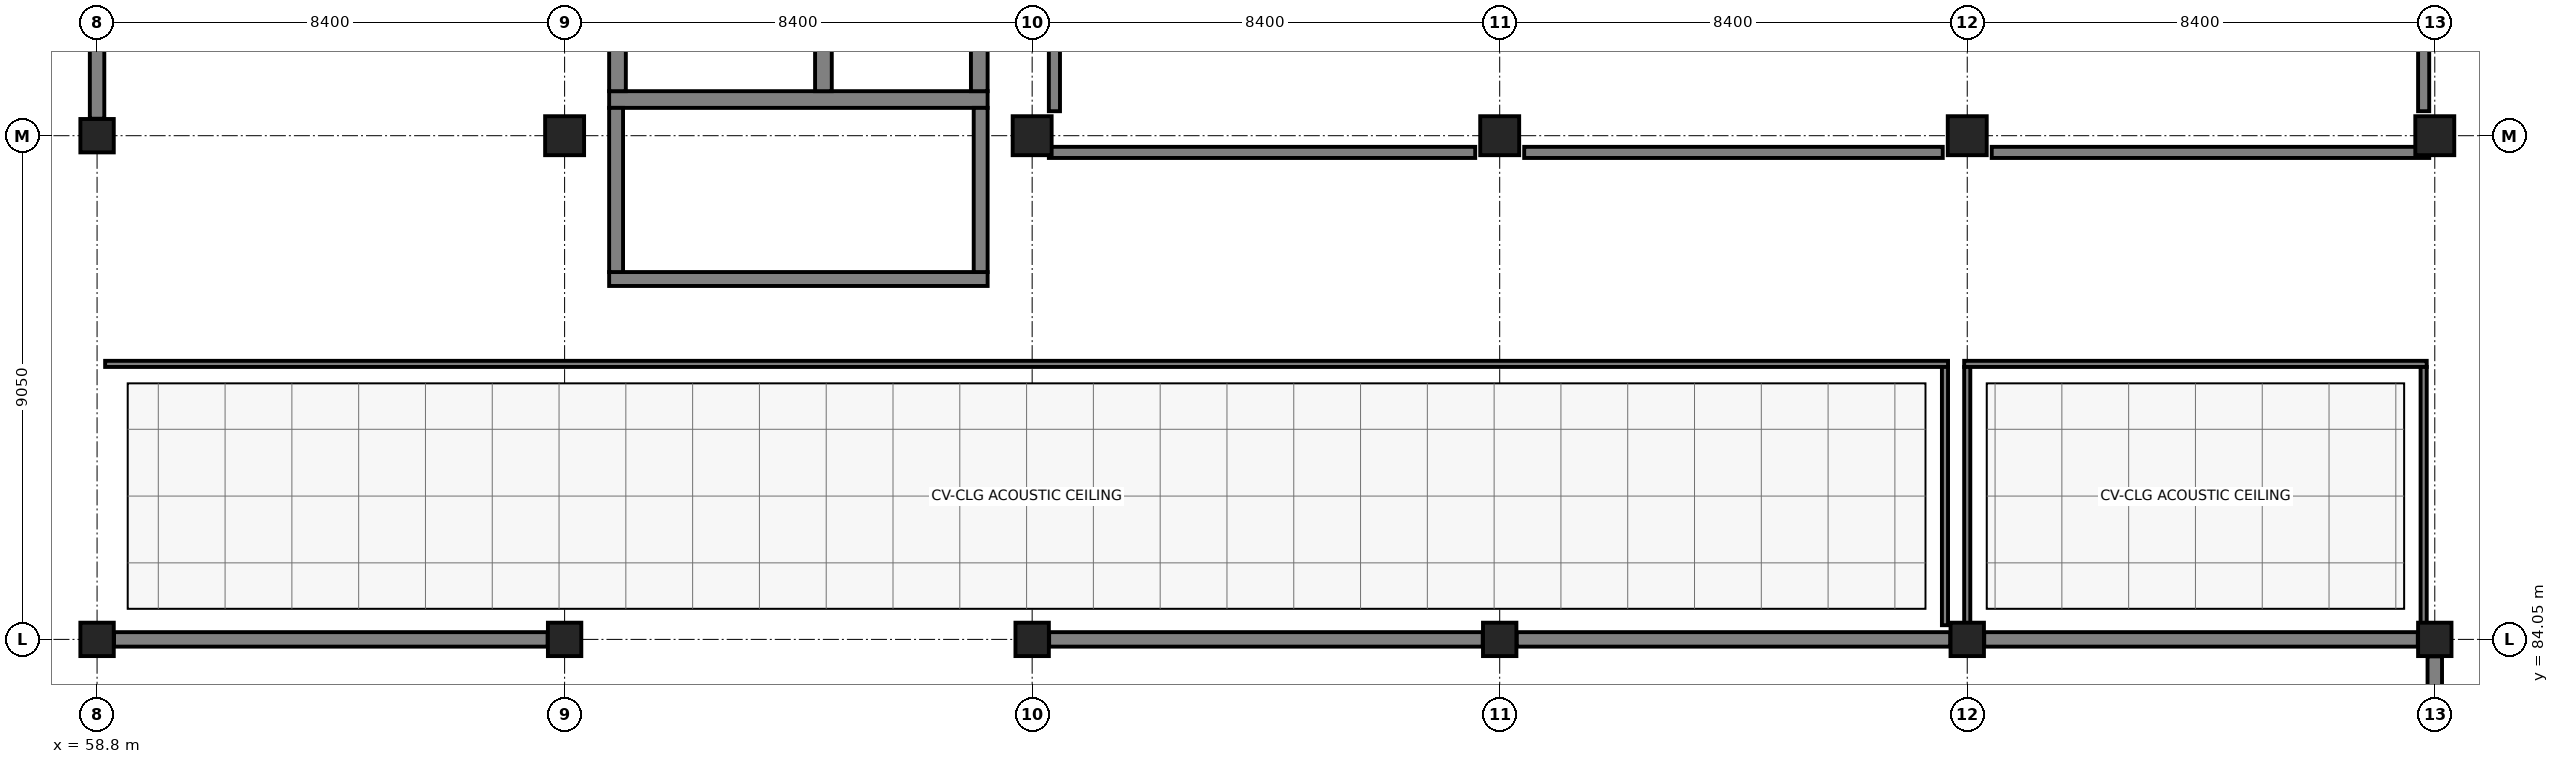
"""IFC4 building model, lengths in metres.
Left out: names, types, materials, properties, quantities, classifications, styles, units other than length and angle.
Written with IfcOpenShell. Run it as: python <this file> out.ifc"""

import sys

from ifc_helpers import new_model, si_unit, direction, frame, frame_2d, origin, origin_2d, place, context, subcontext, project, spatial, rectangle, extrude, element, fill, save


model = new_model("IFC4")
c1 = context("Model", 3, precision=1e-05, world=origin(), true_north=direction((0.0, 1.0)))
c2 = subcontext(c1, "Body", "Model", "MODEL_VIEW")
j1 = project(units=[si_unit("LENGTHUNIT", "METRE"), si_unit("PLANEANGLEUNIT", "RADIAN")], contexts=[c1])
p1 = place(None, origin())
s1 = spatial("IfcSite", under=j1, at=p1, CompositionType="ELEMENT")
p2 = place(p1, origin())
s2 = spatial("IfcBuilding", under=s1, at=p2, CompositionType="ELEMENT")
p3 = place(p2, frame((0.0, 0.0, 10.8)))
s3 = spatial("IfcBuildingStorey", under=s2, at=p3, CompositionType="ELEMENT", Elevation=10.8)
for number, where, z_axis, x_axis in (
    (1, (58.8, 84.05, 0.0), (0.0, 0.0, 1.0), (1.0, 0.0, 0.0)),
    (2, (58.8, 93.1, 0.0), (0.0, 0.0, 1.0), (1.0, 0.0, 0.0)),
    (3, (67.2, 84.05, 0.0), (0.0, 0.0, 1.0), (1.0, 0.0, 0.0)),
):
    element("IfcColumn", number, at=place(p3, frame(where, z_axis=z_axis, x_axis=x_axis)), inside=s3, PredefinedType="COLUMN", context=c2, shape_type="SweptSolid", body=[
        extrude(rectangle(XDim=0.6, YDim=0.6, at=origin_2d()), origin(), (0.0, 0.0, 1.0), 4.8),
    ])
p4 = place(p3, frame((67.2, 93.1, 0.0), z_axis=(0.0, 0.0, 1.0), x_axis=(1.0, 0.0, 0.0)))
e4 = element("IfcColumn", 4, at=p4, inside=s3, PredefinedType="COLUMN", context=c2, shape_type="SweptSolid", body=[
    extrude(rectangle(XDim=0.7, YDim=0.7, at=origin_2d()), origin(), (0.0, 0.0, 1.0), 4.8),
])
p5 = place(p3, frame((75.6, 84.05, 0.0), z_axis=(0.0, 0.0, 1.0), x_axis=(1.0, 0.0, 0.0)))
e5 = element("IfcColumn", 5, at=p5, inside=s3, PredefinedType="COLUMN", context=c2, shape_type="SweptSolid", body=[
    extrude(rectangle(XDim=0.6, YDim=0.6, at=origin_2d()), origin(), (0.0, 0.0, 1.0), 4.8),
])
p6 = place(p3, frame((75.6, 93.1, 0.0), z_axis=(0.0, 0.0, 1.0), x_axis=(1.0, 0.0, 0.0)))
e6 = element("IfcColumn", 6, at=p6, inside=s3, PredefinedType="COLUMN", context=c2, shape_type="SweptSolid", body=[
    extrude(rectangle(XDim=0.7, YDim=0.7, at=origin_2d()), origin(), (0.0, 0.0, 1.0), 4.8),
])
p7 = place(p3, frame((84.0, 84.05, 0.0), z_axis=(0.0, 0.0, 1.0), x_axis=(1.0, 0.0, 0.0)))
e7 = element("IfcColumn", 7, at=p7, inside=s3, PredefinedType="COLUMN", context=c2, shape_type="SweptSolid", body=[
    extrude(rectangle(XDim=0.6, YDim=0.6, at=origin_2d()), origin(), (0.0, 0.0, 1.0), 4.8),
])
p8 = place(p3, frame((84.0, 93.1, 0.0), z_axis=(0.0, 0.0, 1.0), x_axis=(1.0, 0.0, 0.0)))
e8 = element("IfcColumn", 8, at=p8, inside=s3, PredefinedType="COLUMN", context=c2, shape_type="SweptSolid", body=[
    extrude(rectangle(XDim=0.7, YDim=0.7, at=origin_2d()), origin(), (0.0, 0.0, 1.0), 4.8),
])
p9 = place(p3, frame((92.4, 84.05, 0.0), z_axis=(0.0, 0.0, 1.0), x_axis=(1.0, 0.0, 0.0)))
e9 = element("IfcColumn", 9, at=p9, inside=s3, PredefinedType="COLUMN", context=c2, shape_type="SweptSolid", body=[
    extrude(rectangle(XDim=0.6, YDim=0.6, at=origin_2d()), origin(), (0.0, 0.0, 1.0), 4.8),
])
p10 = place(p3, frame((92.4, 93.1, 0.0), z_axis=(0.0, 0.0, 1.0), x_axis=(1.0, 0.0, 0.0)))
e10 = element("IfcColumn", 10, at=p10, inside=s3, PredefinedType="COLUMN", context=c2, shape_type="SweptSolid", body=[
    extrude(rectangle(XDim=0.7, YDim=0.7, at=origin_2d()), origin(), (0.0, 0.0, 1.0), 4.8),
])
p11 = place(p3, frame((100.8, 84.05, 0.0), z_axis=(0.0, 0.0, 1.0), x_axis=(1.0, 0.0, 0.0)))
e11 = element("IfcColumn", 11, at=p11, inside=s3, PredefinedType="COLUMN", context=c2, shape_type="SweptSolid", body=[
    extrude(rectangle(XDim=0.6, YDim=0.6, at=origin_2d()), origin(), (0.0, 0.0, 1.0), 4.8),
])
p12 = place(p3, frame((100.8, 93.1, 0.0), z_axis=(0.0, 0.0, 1.0), x_axis=(1.0, 0.0, 0.0)))
e12 = element("IfcColumn", 12, at=p12, inside=s3, PredefinedType="COLUMN", context=c2, shape_type="SweptSolid", body=[
    extrude(rectangle(XDim=0.7, YDim=0.7, at=origin_2d()), origin(), (0.0, 0.0, 1.0), 4.8),
])
p13 = place(p3, frame((58.8, 101.845, 0.0), z_axis=(0.0, 0.0, 1.0), x_axis=(0.0, -1.0, 0.0)))
e13 = element("IfcWall", 13, at=p13, inside=s3, PredefinedType="STANDARD", context=c2, shape_type="SweptSolid", body=[
    extrude(rectangle(XDim=8.44, YDim=0.26, at=frame_2d((4.22, 0.0))), origin(), (0.0, 0.0, 1.0), 3.65),
])
p14 = place(p13, frame((3.42, 0.0, 0.0)))
e14 = element("IfcOpeningElement", 14, at=p14, cuts=e13, PredefinedType="OPENING", context=c2, shape_type="SweptSolid", body=[
    extrude(rectangle(XDim=1.6, YDim=2.25, at=frame_2d((0.8, 1.125))), frame((0.0, 0.14, 0.0), z_axis=(0.0, -1.0, 0.0), x_axis=(1.0, 0.0, 0.0)), (0.0, 0.0, 1.0), 0.28),
])
p15 = place(p3, frame((59.105, 84.05, 0.0), z_axis=(0.0, 0.0, 1.0), x_axis=(1.0, 0.0, 0.0)))
e15 = element("IfcWall", 15, at=p15, inside=s3, PredefinedType="STANDARD", context=c2, shape_type="SweptSolid", body=[
    extrude(rectangle(XDim=7.79, YDim=0.26, at=frame_2d((3.895, 0.0))), origin(), (0.0, 0.0, 1.0), 3.63),
])
p16 = place(p15, frame((2.215, 0.0, 0.95)))
e16 = element("IfcOpeningElement", 16, at=p16, cuts=e15, PredefinedType="OPENING", context=c2, shape_type="SweptSolid", body=[
    extrude(rectangle(XDim=3.36, YDim=1.96, at=frame_2d((1.68, 0.98))), frame((0.0, 0.14, 0.0), z_axis=(0.0, -1.0, 0.0), x_axis=(1.0, 0.0, 0.0)), (0.0, 0.0, 1.0), 0.28),
])
p17 = place(p3, frame((75.905, 84.05, 0.0), z_axis=(0.0, 0.0, 1.0), x_axis=(1.0, 0.0, 0.0)))
e17 = element("IfcWall", 17, at=p17, inside=s3, PredefinedType="STANDARD", context=c2, shape_type="SweptSolid", body=[
    extrude(rectangle(XDim=7.79, YDim=0.26, at=frame_2d((3.895, 0.0))), origin(), (0.0, 0.0, 1.0), 3.63),
])
p18 = place(p17, frame((3.145, 0.0, 0.95)))
e18 = element("IfcOpeningElement", 18, at=p18, cuts=e17, PredefinedType="OPENING", context=c2, shape_type="SweptSolid", body=[
    extrude(rectangle(XDim=1.5, YDim=2.1, at=frame_2d((0.75, 1.05))), frame((0.0, 0.14, 0.0), z_axis=(0.0, -1.0, 0.0), x_axis=(1.0, 0.0, 0.0)), (0.0, 0.0, 1.0), 0.28),
])
p19 = place(p3, frame((84.305, 84.05, 0.0), z_axis=(0.0, 0.0, 1.0), x_axis=(1.0, 0.0, 0.0)))
e19 = element("IfcWall", 19, at=p19, inside=s3, PredefinedType="STANDARD", context=c2, shape_type="SweptSolid", body=[
    extrude(rectangle(XDim=7.79, YDim=0.26, at=frame_2d((3.895, 0.0))), origin(), (0.0, 0.0, 1.0), 3.63),
])
p20 = place(p19, frame((3.295, 0.0, 0.95)))
e20 = element("IfcOpeningElement", 20, at=p20, cuts=e19, PredefinedType="OPENING", context=c2, shape_type="SweptSolid", body=[
    extrude(rectangle(XDim=1.2, YDim=1.8, at=frame_2d((0.6, 0.9))), frame((0.0, 0.14, 0.0), z_axis=(0.0, -1.0, 0.0), x_axis=(1.0, 0.0, 0.0)), (0.0, 0.0, 1.0), 0.28),
])
p21 = place(p3, frame((92.705, 84.05, 0.0), z_axis=(0.0, 0.0, 1.0), x_axis=(1.0, 0.0, 0.0)))
e21 = element("IfcWall", 21, at=p21, inside=s3, PredefinedType="STANDARD", context=c2, shape_type="SweptSolid", body=[
    extrude(rectangle(XDim=7.79, YDim=0.26, at=frame_2d((3.895, 0.0))), origin(), (0.0, 0.0, 1.0), 3.63),
])
p22 = place(p21, frame((3.095, 0.0, 0.95)))
e22 = element("IfcOpeningElement", 22, at=p22, cuts=e21, PredefinedType="OPENING", context=c2, shape_type="SweptSolid", body=[
    extrude(rectangle(XDim=1.6, YDim=2.2, at=frame_2d((0.8, 1.1))), frame((0.0, 0.14, 0.0), z_axis=(0.0, -1.0, 0.0), x_axis=(1.0, 0.0, 0.0)), (0.0, 0.0, 1.0), 0.28),
])
p23 = place(p3, frame((100.8, 83.745, 0.0), z_axis=(0.0, 0.0, 1.0), x_axis=(0.0, -1.0, 0.0)))
e23 = element("IfcWall", 23, at=p23, inside=s3, PredefinedType="STANDARD", context=c2, shape_type="SweptSolid", body=[
    extrude(rectangle(XDim=8.44, YDim=0.26, at=frame_2d((4.22, 0.0))), origin(), (0.0, 0.0, 1.0), 4.5),
])
p24 = place(p23, frame((3.17, 0.0, 0.95)))
e24 = element("IfcOpeningElement", 24, at=p24, cuts=e23, PredefinedType="OPENING", context=c2, shape_type="SweptSolid", body=[
    extrude(rectangle(XDim=2.1, YDim=2.1, at=frame_2d((1.05, 1.05))), frame((0.0, 0.14, 0.0), z_axis=(0.0, -1.0, 0.0), x_axis=(1.0, 0.0, 0.0)), (0.0, 0.0, 1.0), 0.28),
])
p25 = place(p3, frame((68.0, 93.75, 0.0), z_axis=(0.0, 0.0, 1.0), x_axis=(1.0, 0.0, 0.0)))
e25 = element("IfcWall", 25, at=p25, inside=s3, PredefinedType="SHEAR", context=c2, shape_type="SweptSolid", body=[
    extrude(rectangle(XDim=6.8, YDim=0.3, at=frame_2d((3.4, 0.0))), origin(), (0.0, 0.0, 1.0), 4.5),
])
p26 = place(p25, frame((1.425, 0.0, 0.0)))
e26 = element("IfcOpeningElement", 26, at=p26, cuts=e25, PredefinedType="OPENING", context=c2, shape_type="SweptSolid", body=[
    extrude(rectangle(XDim=1.15, YDim=2.2, at=frame_2d((0.575, 1.1))), frame((0.0, 0.16, 0.0), z_axis=(0.0, -1.0, 0.0), x_axis=(1.0, 0.0, 0.0)), (0.0, 0.0, 1.0), 0.32),
])
p27 = place(p25, frame((4.5, 0.0, 0.0)))
e27 = element("IfcOpeningElement", 27, at=p27, cuts=e25, PredefinedType="OPENING", context=c2, shape_type="SweptSolid", body=[
    extrude(rectangle(XDim=1.5, YDim=2.3, at=frame_2d((0.75, 1.15))), frame((0.0, 0.16, 0.0), z_axis=(0.0, -1.0, 0.0), x_axis=(1.0, 0.0, 0.0)), (0.0, 0.0, 1.0), 0.32),
])
for number, where, z_axis, x_axis in (
    (28, (68.15, 93.9, 0.0), (0.0, 0.0, 1.0), (0.0, 1.0, 0.0)),
    (29, (74.65, 93.9, 0.0), (0.0, 0.0, 1.0), (0.0, 1.0, 0.0)),
    (30, (71.85, 93.9, 0.0), (0.0, 0.0, 1.0), (0.0, 1.0, 0.0)),
):
    element("IfcWall", number, at=place(p3, frame(where, z_axis=z_axis, x_axis=x_axis)), inside=s3, PredefinedType="SHEAR", context=c2, shape_type="SweptSolid", body=[
        extrude(rectangle(XDim=7.4, YDim=0.3, at=frame_2d((3.7, 0.0))), origin(), (0.0, 0.0, 1.0), 4.5),
    ])
p28 = place(p3, frame((68.0, 90.525, 0.0), z_axis=(0.0, 0.0, 1.0), x_axis=(1.0, 0.0, 0.0)))
e31 = element("IfcWall", 31, at=p28, inside=s3, PredefinedType="PARTITIONING", context=c2, shape_type="SweptSolid", body=[
    extrude(rectangle(XDim=6.8, YDim=0.25, at=frame_2d((3.4, 0.0))), origin(), (0.0, 0.0, 1.0), 4.5),
])
p29 = place(p28, frame((2.5, 0.0, 0.0)))
e32 = element("IfcOpeningElement", 32, at=p29, cuts=e31, PredefinedType="OPENING", context=c2, shape_type="SweptSolid", body=[
    extrude(rectangle(XDim=1.8, YDim=2.25, at=frame_2d((0.9, 1.125))), frame((0.0, 0.135, 0.0), z_axis=(0.0, -1.0, 0.0), x_axis=(1.0, 0.0, 0.0)), (0.0, 0.0, 1.0), 0.27),
])
for number, where, z_axis, x_axis in (
    (33, (68.125, 90.65, 0.0), (0.0, 0.0, 1.0), (0.0, 1.0, 0.0)),
    (34, (74.675, 90.65, 0.0), (0.0, 0.0, 1.0), (0.0, 1.0, 0.0)),
):
    element("IfcWall", number, at=place(p3, frame(where, z_axis=z_axis, x_axis=x_axis)), inside=s3, PredefinedType="PARTITIONING", context=c2, shape_type="SweptSolid", body=[
        extrude(rectangle(XDim=2.95, YDim=0.25, at=frame_2d((1.475, 0.0))), origin(), (0.0, 0.0, 1.0), 3.73),
    ])
p30 = place(p3, frame((58.945, 89.0, 0.0), z_axis=(0.0, 0.0, 1.0), x_axis=(1.0, 0.0, 0.0)))
e35 = element("IfcWall", 35, at=p30, inside=s3, PredefinedType="PARTITIONING", context=c2, shape_type="SweptSolid", body=[
    extrude(rectangle(XDim=33.11, YDim=0.11, at=frame_2d((16.555, 0.0))), origin(), (0.0, 0.0, 1.0), 2.31),
])
p31 = place(p30, frame((15.895, 0.0, 0.0)))
e36 = element("IfcOpeningElement", 36, at=p31, cuts=e35, PredefinedType="OPENING", context=c2, shape_type="SweptSolid", body=[
    extrude(rectangle(XDim=1.32, YDim=2.25, at=frame_2d((0.66, 1.125))), frame((0.0, 0.065, 0.0), z_axis=(0.0, -1.0, 0.0), x_axis=(1.0, 0.0, 0.0)), (0.0, 0.0, 1.0), 0.13),
])
p32 = place(p3, frame((92.0, 84.305, 0.0), z_axis=(0.0, 0.0, 1.0), x_axis=(0.0, 1.0, 0.0)))
e37 = element("IfcWall", 37, at=p32, inside=s3, PredefinedType="PARTITIONING", context=c2, shape_type="SweptSolid", body=[
    extrude(rectangle(XDim=4.64, YDim=0.11, at=frame_2d((2.32, 0.0))), origin(), (0.0, 0.0, 1.0), 3.63),
])
p33 = place(p3, frame((75.9, 92.8, 0.0), z_axis=(0.0, 0.0, 1.0), x_axis=(1.0, 0.0, 0.0)))
e38 = element("IfcWall", 38, at=p33, inside=s3, PredefinedType="PARTITIONING", context=c2, shape_type="SweptSolid", body=[
    extrude(rectangle(XDim=7.66, YDim=0.2, at=frame_2d((3.83, 0.0))), origin(), (0.0, 0.0, 1.0), 3.73),
])
p34 = place(p33, frame((3.14, 0.0, 0.0)))
e39 = element("IfcOpeningElement", 39, at=p34, cuts=e38, PredefinedType="OPENING", context=c2, shape_type="SweptSolid", body=[
    extrude(rectangle(XDim=1.38, YDim=2.3, at=frame_2d((0.69, 1.15))), frame((0.0, 0.11, 0.0), z_axis=(0.0, -1.0, 0.0), x_axis=(1.0, 0.0, 0.0)), (0.0, 0.0, 1.0), 0.22),
])
p35 = place(p3, frame((84.44, 92.8, 0.0), z_axis=(0.0, 0.0, 1.0), x_axis=(1.0, 0.0, 0.0)))
e40 = element("IfcWall", 40, at=p35, inside=s3, PredefinedType="PARTITIONING", context=c2, shape_type="SweptSolid", body=[
    extrude(rectangle(XDim=7.52, YDim=0.2, at=frame_2d((3.76, 0.0))), origin(), (0.0, 0.0, 1.0), 3.73),
])
p36 = place(p3, frame((92.84, 92.8, 0.0), z_axis=(0.0, 0.0, 1.0), x_axis=(1.0, 0.0, 0.0)))
e41 = element("IfcWall", 41, at=p36, inside=s3, PredefinedType="PARTITIONING", context=c2, shape_type="SweptSolid", body=[
    extrude(rectangle(XDim=7.86, YDim=0.2, at=frame_2d((3.93, 0.0))), origin(), (0.0, 0.0, 1.0), 3.73),
])
for number, where, z_axis, x_axis in (
    (42, (100.6, 93.54, 0.0), (0.0, 0.0, 1.0), (0.0, 1.0, 0.0)),
    (43, (76.0, 93.54, 0.0), (0.0, 0.0, 1.0), (0.0, 1.0, 0.0)),
):
    element("IfcWall", number, at=place(p3, frame(where, z_axis=z_axis, x_axis=x_axis)), inside=s3, PredefinedType="PARTITIONING", context=c2, shape_type="SweptSolid", body=[
        extrude(rectangle(XDim=8.31, YDim=0.2, at=frame_2d((4.155, 0.0))), origin(), (0.0, 0.0, 1.0), 3.63),
    ])
p37 = place(p3, frame((92.345, 89.0, 0.0), z_axis=(0.0, 0.0, 1.0), x_axis=(1.0, 0.0, 0.0)))
e44 = element("IfcWall", 44, at=p37, inside=s3, PredefinedType="PARTITIONING", context=c2, shape_type="SweptSolid", body=[
    extrude(rectangle(XDim=8.31, YDim=0.11, at=frame_2d((4.155, 0.0))), origin(), (0.0, 0.0, 1.0), 3.75),
])
p38 = place(p37, frame((3.675, 0.0, 0.0)))
e45 = element("IfcOpeningElement", 45, at=p38, cuts=e44, PredefinedType="OPENING", context=c2, shape_type="SweptSolid", body=[
    extrude(rectangle(XDim=0.96, YDim=2.2, at=frame_2d((0.48, 1.1))), frame((0.0, 0.065, 0.0), z_axis=(0.0, -1.0, 0.0), x_axis=(1.0, 0.0, 0.0)), (0.0, 0.0, 1.0), 0.13),
])
for number, where, z_axis, x_axis in (
    (46, (100.6, 84.305, 0.0), (0.0, 0.0, 1.0), (0.0, 1.0, 0.0)),
    (47, (92.4, 84.305, 0.0), (0.0, 0.0, 1.0), (0.0, 1.0, 0.0)),
):
    element("IfcWall", number, at=place(p3, frame(where, z_axis=z_axis, x_axis=x_axis)), inside=s3, PredefinedType="PARTITIONING", context=c2, shape_type="SweptSolid", body=[
        extrude(rectangle(XDim=4.64, YDim=0.11, at=frame_2d((2.32, 0.0))), origin(), (0.0, 0.0, 1.0), 3.63),
    ])
p39 = place(p16, origin())
e48 = element("IfcWindow", 48, at=p39, inside=s3, PartitioningType="SINGLE_PANEL", PredefinedType="WINDOW", context=c2, shape_type="SweptSolid", body=[
    extrude(rectangle(XDim=3.36, YDim=1.96, at=frame_2d((1.68, 0.98))), frame((0.0, 0.03, 0.0), z_axis=(0.0, -1.0, 0.0), x_axis=(1.0, 0.0, 0.0)), (0.0, 0.0, 1.0), 0.06),
])
fill(e16, e48)
p40 = place(p18, origin())
e49 = element("IfcWindow", 49, at=p40, inside=s3, PartitioningType="SINGLE_PANEL", PredefinedType="WINDOW", context=c2, shape_type="SweptSolid", body=[
    extrude(rectangle(XDim=1.5, YDim=2.1, at=frame_2d((0.75, 1.05))), frame((0.0, 0.03, 0.0), z_axis=(0.0, -1.0, 0.0), x_axis=(1.0, 0.0, 0.0)), (0.0, 0.0, 1.0), 0.06),
])
fill(e18, e49)
p41 = place(p20, origin())
e50 = element("IfcWindow", 50, at=p41, inside=s3, PartitioningType="SINGLE_PANEL", PredefinedType="WINDOW", context=c2, shape_type="SweptSolid", body=[
    extrude(rectangle(XDim=1.2, YDim=1.8, at=frame_2d((0.6, 0.9))), frame((0.0, 0.03, 0.0), z_axis=(0.0, -1.0, 0.0), x_axis=(1.0, 0.0, 0.0)), (0.0, 0.0, 1.0), 0.06),
])
fill(e20, e50)
p42 = place(p22, origin())
e51 = element("IfcWindow", 51, at=p42, inside=s3, PartitioningType="SINGLE_PANEL", PredefinedType="WINDOW", context=c2, shape_type="SweptSolid", body=[
    extrude(rectangle(XDim=1.6, YDim=2.2, at=frame_2d((0.8, 1.1))), frame((0.0, 0.03, 0.0), z_axis=(0.0, -1.0, 0.0), x_axis=(1.0, 0.0, 0.0)), (0.0, 0.0, 1.0), 0.06),
])
fill(e22, e51)
p43 = place(p26, origin())
e52 = element("IfcDoor", 52, at=p43, inside=s3, OperationType="SINGLE_SWING_RIGHT", PredefinedType="DOOR", context=c2, shape_type="SweptSolid", body=[
    extrude(rectangle(XDim=1.15, YDim=2.2, at=frame_2d((0.575, 1.1))), frame((0.0, 0.025, 0.0), z_axis=(0.0, -1.0, 0.0), x_axis=(1.0, 0.0, 0.0)), (0.0, 0.0, 1.0), 0.05),
])
fill(e26, e52)
p44 = place(p27, origin())
e53 = element("IfcDoor", 53, at=p44, inside=s3, OperationType="DOUBLE_DOOR_SLIDING", PredefinedType="DOOR", context=c2, shape_type="SweptSolid", body=[
    extrude(rectangle(XDim=1.5, YDim=2.3, at=frame_2d((0.75, 1.15))), frame((0.0, 0.025, 0.0), z_axis=(0.0, -1.0, 0.0), x_axis=(1.0, 0.0, 0.0)), (0.0, 0.0, 1.0), 0.05),
])
fill(e27, e53)
p45 = place(p29, frame((1.8, 0.0, 0.0), z_axis=(0.0, 0.0, 1.0), x_axis=(-1.0, 0.0, 0.0)))
e54 = element("IfcDoor", 54, at=p45, inside=s3, OperationType="DOUBLE_DOOR_SINGLE_SWING", PredefinedType="DOOR", context=c2, shape_type="SweptSolid", body=[
    extrude(rectangle(XDim=1.8, YDim=2.25, at=frame_2d((0.9, 1.125))), frame((0.0, 0.025, 0.0), z_axis=(0.0, -1.0, 0.0), x_axis=(1.0, 0.0, 0.0)), (0.0, 0.0, 1.0), 0.05),
])
fill(e32, e54)
p46 = place(p31, frame((1.32, 0.0, 0.0), z_axis=(0.0, 0.0, 1.0), x_axis=(-1.0, 0.0, 0.0)))
e55 = element("IfcDoor", 55, at=p46, inside=s3, OperationType="SINGLE_SWING_RIGHT", PredefinedType="DOOR", context=c2, shape_type="SweptSolid", body=[
    extrude(rectangle(XDim=1.32, YDim=2.25, at=frame_2d((0.66, 1.125))), frame((0.0, 0.025, 0.0), z_axis=(0.0, -1.0, 0.0), x_axis=(1.0, 0.0, 0.0)), (0.0, 0.0, 1.0), 0.05),
])
fill(e36, e55)
p47 = place(p34, origin())
e56 = element("IfcDoor", 56, at=p47, inside=s3, OperationType="SINGLE_SWING_LEFT", PredefinedType="DOOR", context=c2, shape_type="SweptSolid", body=[
    extrude(rectangle(XDim=1.38, YDim=2.3, at=frame_2d((0.69, 1.15))), frame((0.0, 0.025, 0.0), z_axis=(0.0, -1.0, 0.0), x_axis=(1.0, 0.0, 0.0)), (0.0, 0.0, 1.0), 0.05),
])
fill(e39, e56)
p48 = place(p38, frame((0.96, 0.0, 0.0), z_axis=(0.0, 0.0, 1.0), x_axis=(-1.0, 0.0, 0.0)))
e57 = element("IfcDoor", 57, at=p48, inside=s3, OperationType="SINGLE_SWING_RIGHT", PredefinedType="DOOR", context=c2, shape_type="SweptSolid", body=[
    extrude(rectangle(XDim=0.96, YDim=2.2, at=frame_2d((0.48, 1.1))), frame((0.0, 0.025, 0.0), z_axis=(0.0, -1.0, 0.0), x_axis=(1.0, 0.0, 0.0)), (0.0, 0.0, 1.0), 0.05),
])
fill(e45, e57)
save(model, sys.argv[1])
